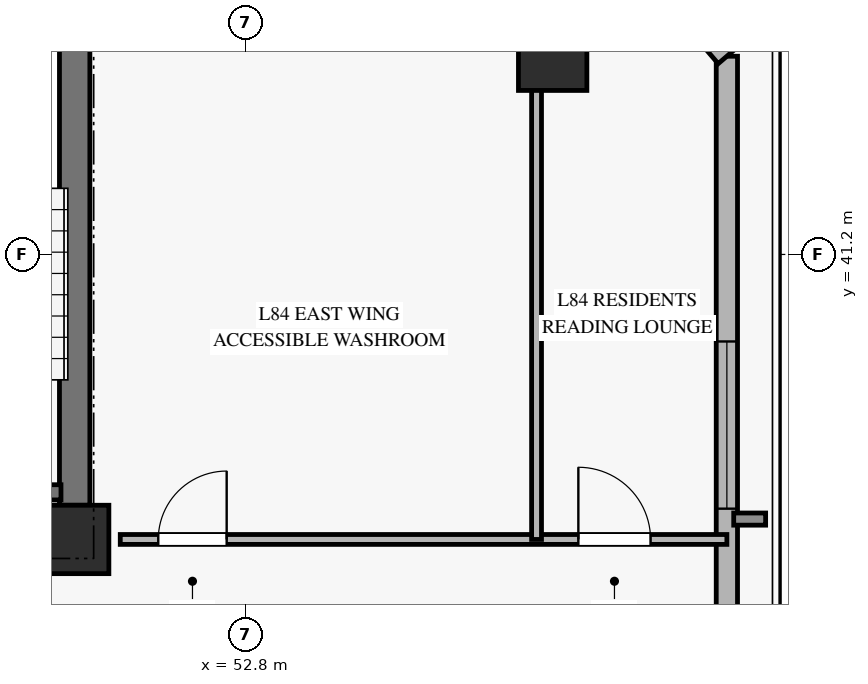
"""IFC4 building model, lengths in metres.
Left out: names, types, materials, properties, quantities, classifications, styles, units other than length and angle.
Written with IfcOpenShell. Run it as: python <this file> out.ifc"""

import sys

from ifc_helpers import new_model, si_unit, direction, frame, frame_2d, origin, origin_2d, place, context, subcontext, project, spatial, rectangle, hollow_rectangle, extrude, source, transform, mapped, element, fill, save


model = new_model("IFC4")
c1 = context("Model", 3, precision=1e-05, world=origin(), true_north=direction((0.0, 1.0)))
c2 = subcontext(c1, "Body", "Model", "MODEL_VIEW")
j1 = project(units=[si_unit("LENGTHUNIT", "METRE"), si_unit("PLANEANGLEUNIT", "RADIAN")], contexts=[c1])
p1 = place(None, origin())
s1 = spatial("IfcSite", under=j1, at=p1, CompositionType="ELEMENT")
p2 = place(p1, origin())
s2 = spatial("IfcBuilding", under=s1, at=p2, CompositionType="ELEMENT")
p3 = place(p2, frame((0.0, 0.0, 324.4)))
s3 = spatial("IfcBuildingStorey", under=s2, at=p3, CompositionType="ELEMENT", Elevation=324.4)
m1 = source(origin(), c2, "Body", "SweptSolid", [
    extrude(rectangle(XDim=0.9, YDim=0.9, at=origin_2d()), origin(), (0.0, 0.0, 1.0), 3.12),
])
p4 = place(p3, frame((50.55, 37.45, 0.0), z_axis=(0.0, 0.0, 1.0), x_axis=(1.0, 0.0, 0.0)))
e1 = element("IfcColumn", 1, at=p4, inside=s3, PredefinedType="PILASTER", context=c2, shape_type="MappedRepresentation", body=[
    mapped(m1, transform((0.0, 0.0, 0.0), x_axis=(1.0, 0.0, 0.0), y_axis=(0.0, 1.0, 0.0), z_axis=(0.0, 0.0, 1.0), scale=1.0)),
])
p5 = place(p3, frame((50.55, 37.9, 0.0), z_axis=(0.0, 0.0, 1.0), x_axis=(0.0, 1.0, 0.0)))
e2 = element("IfcWall", 2, at=p5, inside=s3, PredefinedType="SHEAR", context=c2, shape_type="SweptSolid", body=[
    extrude(rectangle(XDim=8.2, YDim=0.4, at=frame_2d((4.1, 0.0))), origin(), (0.0, 0.0, 1.0), 3.12),
])
m2 = source(origin(), c2, "Body", "SweptSolid", [
    extrude(hollow_rectangle(XDim=0.9, YDim=0.9, WallThickness=0.04, at=origin_2d()), origin(), (0.0, 0.0, 1.0), 3.12),
])
p6 = place(p3, frame((56.839, 43.808, 0.0), z_axis=(0.0, 0.0, 1.0), x_axis=(1.0, 0.0, 0.0)))
e3 = element("IfcColumn", 3, at=p6, inside=s3, PredefinedType="COLUMN", context=c2, shape_type="MappedRepresentation", body=[
    mapped(m2, transform((0.0, 0.0, 0.0), x_axis=(1.0, 0.0, 0.0), y_axis=(0.0, 1.0, 0.0), z_axis=(0.0, 0.0, 1.0), scale=1.0)),
])
p7 = place(p3, frame((59.131, 34.068, 0.0), z_axis=(0.0, 0.0, 1.0), x_axis=(0.0, 1.0, 0.0)))
e4 = element("IfcWall", 4, at=p7, inside=s3, PredefinedType="SOLIDWALL", context=c2, shape_type="SweptSolid", body=[
    extrude(rectangle(XDim=9.74, YDim=0.28, at=frame_2d((4.87, 0.0))), origin(), (0.0, 0.0, 1.0), 2.75),
])
p8 = place(p7, frame((3.787, 0.0, 0.45)))
e5 = element("IfcOpeningElement", 5, at=p8, cuts=e4, PredefinedType="OPENING", context=c2, shape_type="SweptSolid", body=[
    extrude(rectangle(XDim=2.2, YDim=2.1, at=frame_2d((1.1, 1.05))), frame((0.0, 0.15, 0.0), z_axis=(0.0, -1.0, 0.0), x_axis=(1.0, 0.0, 0.0)), (0.0, 0.0, 1.0), 0.3),
])
p9 = place(p3, frame((59.131, 43.808, 0.0), z_axis=(0.0, 0.0, 1.0), x_axis=(-0.650610025707, 0.759412005732, 0.0)))
e6 = element("IfcWall", 6, at=p9, inside=s3, PredefinedType="SOLIDWALL", context=c2, shape_type="SweptSolid", body=[
    extrude(rectangle(XDim=3.216, YDim=0.3, at=frame_2d((1.608, 0.0))), origin(), (0.0, 0.0, 1.0), 2.75),
])
p10 = place(p9, frame((0.808, 0.0, 0.45)))
e7 = element("IfcOpeningElement", 7, at=p10, cuts=e6, PredefinedType="OPENING", context=c2, shape_type="SweptSolid", body=[
    extrude(rectangle(XDim=1.6, YDim=2.0, at=frame_2d((0.8, 1.0))), frame((0.0, 0.16, 0.0), z_axis=(0.0, -1.0, 0.0), x_axis=(1.0, 0.0, 0.0)), (0.0, 0.0, 1.0), 0.32),
])
p11 = place(p3, frame((47.44, 38.07, 0.0), z_axis=(0.0, 0.0, 1.0), x_axis=(1.0, 0.0, 0.0)))
e8 = element("IfcWall", 8, at=p11, inside=s3, PredefinedType="SOLIDWALL", context=c2, shape_type="SweptSolid", body=[
    extrude(rectangle(XDim=2.93, YDim=0.2, at=frame_2d((1.465, 0.0))), origin(), (0.0, 0.0, 1.0), 3.4),
])
p12 = place(p3, frame((51.15, 37.45, 0.0), z_axis=(0.0, 0.0, 1.0), x_axis=(1.0, 0.0, 0.0)))
e9 = element("IfcWall", 9, at=p12, inside=s3, PredefinedType="PARTITIONING", context=c2, shape_type="SweptSolid", body=[
    extrude(rectangle(XDim=7.981, YDim=0.13, at=frame_2d((3.991, 0.0))), origin(), (0.0, 0.0, 1.0), 2.755),
])
p13 = place(p12, frame((0.5, 0.0, 0.0)))
e10 = element("IfcOpeningElement", 10, at=p13, cuts=e9, PredefinedType="OPENING", context=c2, shape_type="SweptSolid", body=[
    extrude(rectangle(XDim=0.9, YDim=2.1, at=frame_2d((0.45, 1.05))), frame((0.0, 0.075, 0.0), z_axis=(0.0, -1.0, 0.0), x_axis=(1.0, 0.0, 0.0)), (0.0, 0.0, 1.0), 0.15),
])
p14 = place(p12, frame((6.027, 0.0, 0.0)))
e11 = element("IfcOpeningElement", 11, at=p14, cuts=e9, PredefinedType="OPENING", context=c2, shape_type="SweptSolid", body=[
    extrude(rectangle(XDim=0.95, YDim=2.1, at=frame_2d((0.475, 1.05))), frame((0.0, 0.075, 0.0), z_axis=(0.0, -1.0, 0.0), x_axis=(1.0, 0.0, 0.0)), (0.0, 0.0, 1.0), 0.15),
])
p15 = place(p3, frame((56.627, 37.45, 0.0), z_axis=(0.0, 0.0, 1.0), x_axis=(0.0, 1.0, 0.0)))
e12 = element("IfcWall", 12, at=p15, inside=s3, PredefinedType="PARTITIONING", context=c2, shape_type="SweptSolid", body=[
    extrude(rectangle(XDim=8.8, YDim=0.13, at=frame_2d((4.4, 0.0))), origin(), (0.0, 0.0, 1.0), 3.12),
])
m3 = source(origin(), c2, "Body", "SweptSolid", [
    extrude(rectangle(XDim=2.2, YDim=2.1, at=frame_2d((1.1, 1.05))), frame((0.0, 0.03, 0.0), z_axis=(0.0, -1.0, 0.0), x_axis=(1.0, 0.0, 0.0)), (0.0, 0.0, 1.0), 0.06),
])
p16 = place(p8, origin())
e13 = element("IfcWindow", 13, at=p16, inside=s3, PartitioningType="SINGLE_PANEL", PredefinedType="WINDOW", context=c2, shape_type="MappedRepresentation", body=[
    mapped(m3, transform((0.0, 0.0, 0.0), x_axis=(1.0, 0.0, 0.0), y_axis=(0.0, 1.0, 0.0), z_axis=(0.0, 0.0, 1.0), scale=1.0)),
])
fill(e5, e13)
m4 = source(origin(), c2, "Body", "SweptSolid", [
    extrude(rectangle(XDim=0.9, YDim=2.1, at=frame_2d((0.45, 1.05))), frame((0.0, 0.025, 0.0), z_axis=(0.0, -1.0, 0.0), x_axis=(1.0, 0.0, 0.0)), (0.0, 0.0, 1.0), 0.05),
])
p17 = place(p13, origin())
e14 = element("IfcDoor", 14, at=p17, inside=s3, OperationType="SINGLE_SWING_RIGHT", PredefinedType="DOOR", context=c2, shape_type="MappedRepresentation", body=[
    mapped(m4, transform((0.0, 0.0, 0.0), x_axis=(1.0, 0.0, 0.0), y_axis=(0.0, 1.0, 0.0), z_axis=(0.0, 0.0, 1.0), scale=1.0)),
])
fill(e10, e14)
m5 = source(origin(), c2, "Body", "SweptSolid", [
    extrude(rectangle(XDim=0.95, YDim=2.1, at=frame_2d((0.475, 1.05))), frame((0.0, 0.025, 0.0), z_axis=(0.0, -1.0, 0.0), x_axis=(1.0, 0.0, 0.0)), (0.0, 0.0, 1.0), 0.05),
])
p18 = place(p14, origin())
e15 = element("IfcDoor", 15, at=p18, inside=s3, OperationType="SINGLE_SWING_LEFT", PredefinedType="DOOR", context=c2, shape_type="MappedRepresentation", body=[
    mapped(m5, transform((0.0, 0.0, 0.0), x_axis=(1.0, 0.0, 0.0), y_axis=(0.0, 1.0, 0.0), z_axis=(0.0, 0.0, 1.0), scale=1.0)),
])
fill(e11, e15)
save(model, sys.argv[1])
